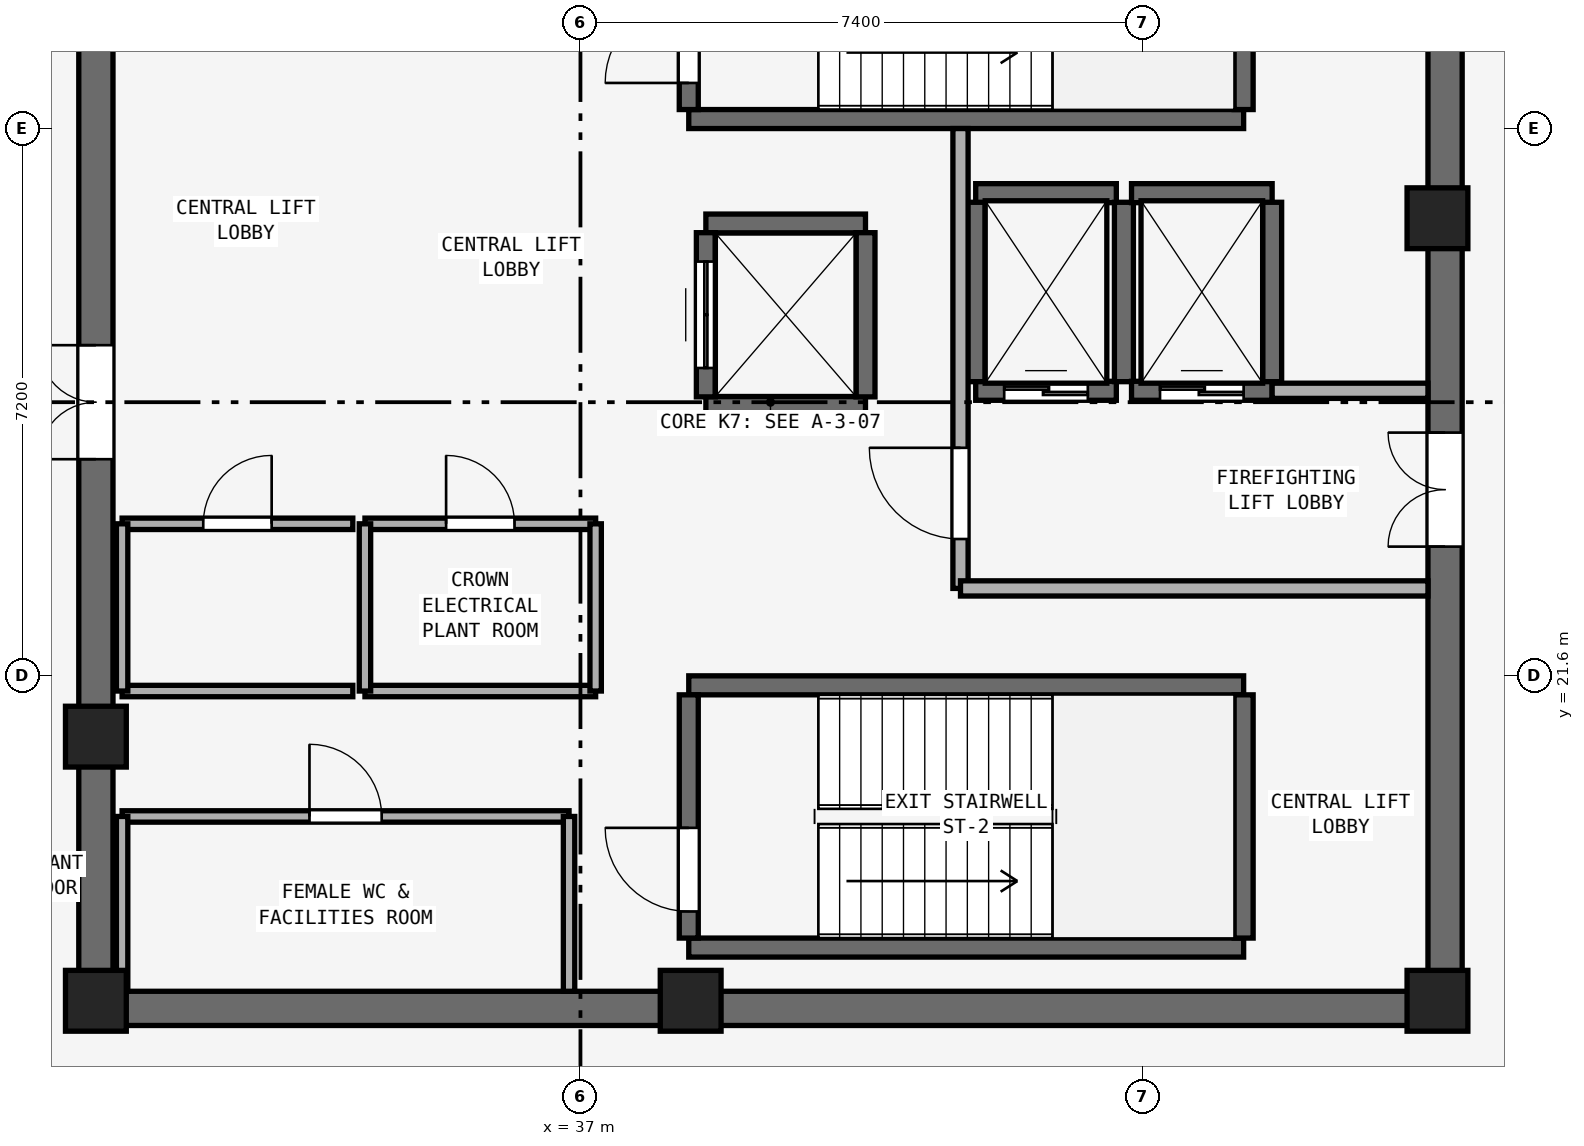
"""IFC4 building model, lengths in metres.
Left out: names, types, materials, properties, quantities, classifications, styles, units other than length and angle.
Written with IfcOpenShell. Run it as: python <this file> out.ifc"""

import sys

from ifc_helpers import new_model, si_unit, direction, frame, frame_2d, origin, origin_2d, place, context, subcontext, project, spatial, rectangle, extrude, element, fill, save


model = new_model("IFC4")
c1 = context("Model", 3, precision=1e-05, world=origin(), true_north=direction((0.0, 1.0)))
c2 = subcontext(c1, "Body", "Model", "MODEL_VIEW")
j1 = project(units=[si_unit("LENGTHUNIT", "METRE"), si_unit("PLANEANGLEUNIT", "RADIAN")], contexts=[c1])
p1 = place(None, origin())
s1 = spatial("IfcSite", under=j1, at=p1, CompositionType="ELEMENT")
p2 = place(p1, origin())
s2 = spatial("IfcBuilding", under=s1, at=p2, CompositionType="ELEMENT")
p3 = place(p2, frame((0.0, 0.0, 313.4)))
s3 = spatial("IfcBuildingStorey", under=s2, at=p3, CompositionType="ELEMENT", Elevation=313.4)
p4 = place(p3, frame((30.4, 17.225, 0.0), z_axis=(0.0, 0.0, 1.0), x_axis=(1.0, 0.0, 0.0)))
e1 = element("IfcWall", 1, at=p4, inside=s3, PredefinedType="SHEAR", context=c2, shape_type="SweptSolid", body=[
    extrude(rectangle(XDim=18.2, YDim=0.45, at=frame_2d((9.1, 0.0))), origin(), (0.0, 0.0, 1.0), 3.72),
])
p5 = place(p3, frame((30.625, 17.45, 0.0), z_axis=(0.0, 0.0, 1.0), x_axis=(0.0, 1.0, 0.0)))
e2 = element("IfcWall", 2, at=p5, inside=s3, PredefinedType="SHEAR", context=c2, shape_type="SweptSolid", body=[
    extrude(rectangle(XDim=15.5, YDim=0.45, at=frame_2d((7.75, 0.0))), origin(), (0.0, 0.0, 1.0), 3.72),
])
p6 = place(p5, frame((7.0, 0.0, 0.0)))
e3 = element("IfcOpeningElement", 3, at=p6, cuts=e2, PredefinedType="OPENING", context=c2, shape_type="SweptSolid", body=[
    extrude(rectangle(XDim=1.5, YDim=2.15, at=frame_2d((0.75, 1.075))), frame((0.0, 0.235, 0.0), z_axis=(0.0, -1.0, 0.0), x_axis=(1.0, 0.0, 0.0)), (0.0, 0.0, 1.0), 0.47),
])
p7 = place(p3, frame((48.375, 17.45, 0.0), z_axis=(0.0, 0.0, 1.0), x_axis=(0.0, 1.0, 0.0)))
e4 = element("IfcWall", 4, at=p7, inside=s3, PredefinedType="SHEAR", context=c2, shape_type="SweptSolid", body=[
    extrude(rectangle(XDim=15.5, YDim=0.45, at=frame_2d((7.75, 0.0))), origin(), (0.0, 0.0, 1.0), 3.72),
])
p8 = place(p7, frame((5.85, 0.0, 0.0)))
e5 = element("IfcOpeningElement", 5, at=p8, cuts=e4, PredefinedType="OPENING", context=c2, shape_type="SweptSolid", body=[
    extrude(rectangle(XDim=1.5, YDim=2.15, at=frame_2d((0.75, 1.075))), frame((0.0, 0.235, 0.0), z_axis=(0.0, -1.0, 0.0), x_axis=(1.0, 0.0, 0.0)), (0.0, 0.0, 1.0), 0.47),
])
for number, where, z_axis, x_axis in (
    (6, (30.625, 17.325, 0.0), (0.0, 0.0, 1.0), (1.0, 0.0, 0.0)),
    (7, (38.45, 17.325, 0.0), (0.0, 0.0, 1.0), (1.0, 0.0, 0.0)),
    (8, (48.275, 17.325, 0.0), (0.0, 0.0, 1.0), (1.0, 0.0, 0.0)),
    (9, (48.275, 27.62, 0.0), (0.0, 0.0, 1.0), (1.0, 0.0, 0.0)),
    (10, (30.625, 20.8, 0.0), (0.0, 0.0, 1.0), (1.0, 0.0, 0.0)),
):
    element("IfcColumn", number, at=place(p3, frame(where, z_axis=z_axis, x_axis=x_axis)), inside=s3, PredefinedType="PILASTER", context=c2, shape_type="SweptSolid", body=[
        extrude(rectangle(XDim=0.8, YDim=0.8, at=origin_2d()), origin(), (0.0, 0.0, 1.0), 4.0),
    ])
p9 = place(p3, frame((38.425, 28.925, 0.0), z_axis=(0.0, 0.0, 1.0), x_axis=(1.0, 0.0, 0.0)))
e11 = element("IfcWall", 11, at=p9, inside=s3, PredefinedType="SHEAR", context=c2, shape_type="SweptSolid", body=[
    extrude(rectangle(XDim=7.3, YDim=0.25, at=frame_2d((3.65, 0.0))), origin(), (0.0, 0.0, 1.0), 3.72),
])
p10 = place(p3, frame((38.425, 29.05, 0.0), z_axis=(0.0, 0.0, 1.0), x_axis=(0.0, 1.0, 0.0)))
e12 = element("IfcWall", 12, at=p10, inside=s3, PredefinedType="SHEAR", context=c2, shape_type="SweptSolid", body=[
    extrude(rectangle(XDim=3.2, YDim=0.25, at=frame_2d((1.6, 0.0))), origin(), (0.0, 0.0, 1.0), 3.72),
])
p11 = place(p10, frame((0.35, 0.0, 0.0)))
e13 = element("IfcOpeningElement", 13, at=p11, cuts=e12, PredefinedType="OPENING", context=c2, shape_type="SweptSolid", body=[
    extrude(rectangle(XDim=1.1, YDim=2.15, at=frame_2d((0.55, 1.075))), frame((0.0, 0.135, 0.0), z_axis=(0.0, -1.0, 0.0), x_axis=(1.0, 0.0, 0.0)), (0.0, 0.0, 1.0), 0.27),
])
p12 = place(p3, frame((45.725, 29.05, 0.0), z_axis=(0.0, 0.0, 1.0), x_axis=(0.0, 1.0, 0.0)))
e14 = element("IfcWall", 14, at=p12, inside=s3, PredefinedType="SHEAR", context=c2, shape_type="SweptSolid", body=[
    extrude(rectangle(XDim=3.2, YDim=0.25, at=frame_2d((1.6, 0.0))), origin(), (0.0, 0.0, 1.0), 3.72),
])
for number, where, z_axis, x_axis in (
    (15, (38.425, 18.025, 0.0), (0.0, 0.0, 1.0), (1.0, 0.0, 0.0)),
    (16, (38.425, 21.475, 0.0), (0.0, 0.0, 1.0), (1.0, 0.0, 0.0)),
):
    element("IfcWall", number, at=place(p3, frame(where, z_axis=z_axis, x_axis=x_axis)), inside=s3, PredefinedType="SHEAR", context=c2, shape_type="SweptSolid", body=[
        extrude(rectangle(XDim=7.3, YDim=0.25, at=frame_2d((3.65, 0.0))), origin(), (0.0, 0.0, 1.0), 3.72),
    ])
p13 = place(p3, frame((38.425, 18.15, 0.0), z_axis=(0.0, 0.0, 1.0), x_axis=(0.0, 1.0, 0.0)))
e17 = element("IfcWall", 17, at=p13, inside=s3, PredefinedType="SHEAR", context=c2, shape_type="SweptSolid", body=[
    extrude(rectangle(XDim=3.2, YDim=0.25, at=frame_2d((1.6, 0.0))), origin(), (0.0, 0.0, 1.0), 3.72),
])
p14 = place(p13, frame((0.35, 0.0, 0.0)))
e18 = element("IfcOpeningElement", 18, at=p14, cuts=e17, PredefinedType="OPENING", context=c2, shape_type="SweptSolid", body=[
    extrude(rectangle(XDim=1.1, YDim=2.15, at=frame_2d((0.55, 1.075))), frame((0.0, 0.135, 0.0), z_axis=(0.0, -1.0, 0.0), x_axis=(1.0, 0.0, 0.0)), (0.0, 0.0, 1.0), 0.27),
])
p15 = place(p3, frame((45.725, 18.15, 0.0), z_axis=(0.0, 0.0, 1.0), x_axis=(0.0, 1.0, 0.0)))
e19 = element("IfcWall", 19, at=p15, inside=s3, PredefinedType="SHEAR", context=c2, shape_type="SweptSolid", body=[
    extrude(rectangle(XDim=3.2, YDim=0.25, at=frame_2d((1.6, 0.0))), origin(), (0.0, 0.0, 1.0), 3.72),
])
p16 = place(p3, frame((42.2, 25.35, 0.0), z_axis=(0.0, 0.0, 1.0), x_axis=(1.0, 0.0, 0.0)))
e20 = element("IfcWall", 20, at=p16, inside=s3, PredefinedType="SHEAR", context=c2, shape_type="SweptSolid", body=[
    extrude(rectangle(XDim=1.85, YDim=0.25, at=frame_2d((0.925, 0.0))), origin(), (0.0, 0.0, 1.0), 3.72),
])
p17 = place(p16, frame((0.375, 0.0, 0.0)))
e21 = element("IfcOpeningElement", 21, at=p17, cuts=e20, PredefinedType="OPENING", context=c2, shape_type="SweptSolid", body=[
    extrude(rectangle(XDim=1.1, YDim=2.15, at=frame_2d((0.55, 1.075))), frame((0.0, 0.135, 0.0), z_axis=(0.0, -1.0, 0.0), x_axis=(1.0, 0.0, 0.0)), (0.0, 0.0, 1.0), 0.27),
])
p18 = place(p3, frame((42.2, 27.95, 0.0), z_axis=(0.0, 0.0, 1.0), x_axis=(1.0, 0.0, 0.0)))
e22 = element("IfcWall", 22, at=p18, inside=s3, PredefinedType="SHEAR", context=c2, shape_type="SweptSolid", body=[
    extrude(rectangle(XDim=1.85, YDim=0.25, at=frame_2d((0.925, 0.0))), origin(), (0.0, 0.0, 1.0), 3.72),
])
for number, where, z_axis, x_axis in (
    (23, (42.2, 25.47, 0.0), (0.0, 0.0, 1.0), (0.0, 1.0, 0.0)),
    (24, (44.15, 25.47, 0.0), (0.0, 0.0, 1.0), (0.0, 1.0, 0.0)),
):
    element("IfcWall", number, at=place(p3, frame(where, z_axis=z_axis, x_axis=x_axis)), inside=s3, PredefinedType="SHEAR", context=c2, shape_type="SweptSolid", body=[
        extrude(rectangle(XDim=2.36, YDim=0.25, at=frame_2d((1.18, 0.0))), origin(), (0.0, 0.0, 1.0), 3.72),
    ])
p19 = place(p3, frame((44.25, 25.35, 0.0), z_axis=(0.0, 0.0, 1.0), x_axis=(1.0, 0.0, 0.0)))
e25 = element("IfcWall", 25, at=p19, inside=s3, PredefinedType="SHEAR", context=c2, shape_type="SweptSolid", body=[
    extrude(rectangle(XDim=1.85, YDim=0.25, at=frame_2d((0.925, 0.0))), origin(), (0.0, 0.0, 1.0), 3.72),
])
p20 = place(p19, frame((0.375, 0.0, 0.0)))
e26 = element("IfcOpeningElement", 26, at=p20, cuts=e25, PredefinedType="OPENING", context=c2, shape_type="SweptSolid", body=[
    extrude(rectangle(XDim=1.1, YDim=2.15, at=frame_2d((0.55, 1.075))), frame((0.0, 0.135, 0.0), z_axis=(0.0, -1.0, 0.0), x_axis=(1.0, 0.0, 0.0)), (0.0, 0.0, 1.0), 0.27),
])
p21 = place(p3, frame((44.25, 27.95, 0.0), z_axis=(0.0, 0.0, 1.0), x_axis=(1.0, 0.0, 0.0)))
e27 = element("IfcWall", 27, at=p21, inside=s3, PredefinedType="SHEAR", context=c2, shape_type="SweptSolid", body=[
    extrude(rectangle(XDim=1.85, YDim=0.25, at=frame_2d((0.925, 0.0))), origin(), (0.0, 0.0, 1.0), 3.72),
])
p22 = place(p3, frame((46.1, 25.47, 0.0), z_axis=(0.0, 0.0, 1.0), x_axis=(0.0, 1.0, 0.0)))
e28 = element("IfcWall", 28, at=p22, inside=s3, PredefinedType="SHEAR", context=c2, shape_type="SweptSolid", body=[
    extrude(rectangle(XDim=2.36, YDim=0.25, at=frame_2d((1.18, 0.0))), origin(), (0.0, 0.0, 1.0), 3.72),
])
for number, where, z_axis, x_axis in (
    (29, (38.65, 25.15, 0.0), (0.0, 0.0, 1.0), (1.0, 0.0, 0.0)),
    (30, (38.65, 27.55, 0.0), (0.0, 0.0, 1.0), (1.0, 0.0, 0.0)),
):
    element("IfcWall", number, at=place(p3, frame(where, z_axis=z_axis, x_axis=x_axis)), inside=s3, PredefinedType="SHEAR", context=c2, shape_type="SweptSolid", body=[
        extrude(rectangle(XDim=2.1, YDim=0.25, at=frame_2d((1.05, 0.0))), origin(), (0.0, 0.0, 1.0), 3.72),
    ])
p23 = place(p3, frame((38.65, 25.27, 0.0), z_axis=(0.0, 0.0, 1.0), x_axis=(0.0, 1.0, 0.0)))
e31 = element("IfcWall", 31, at=p23, inside=s3, PredefinedType="SHEAR", context=c2, shape_type="SweptSolid", body=[
    extrude(rectangle(XDim=2.16, YDim=0.25, at=frame_2d((1.08, 0.0))), origin(), (0.0, 0.0, 1.0), 3.72),
])
p24 = place(p23, frame((0.38, 0.0, 0.0)))
e32 = element("IfcOpeningElement", 32, at=p24, cuts=e31, PredefinedType="OPENING", context=c2, shape_type="SweptSolid", body=[
    extrude(rectangle(XDim=1.4, YDim=2.2, at=frame_2d((0.7, 1.1))), frame((0.0, 0.135, 0.0), z_axis=(0.0, -1.0, 0.0), x_axis=(1.0, 0.0, 0.0)), (0.0, 0.0, 1.0), 0.27),
])
p25 = place(p3, frame((40.75, 25.27, 0.0), z_axis=(0.0, 0.0, 1.0), x_axis=(0.0, 1.0, 0.0)))
e33 = element("IfcWall", 33, at=p25, inside=s3, PredefinedType="SHEAR", context=c2, shape_type="SweptSolid", body=[
    extrude(rectangle(XDim=2.16, YDim=0.25, at=frame_2d((1.08, 0.0))), origin(), (0.0, 0.0, 1.0), 3.72),
])
p26 = place(p3, frame((42.0, 22.75, 0.0), z_axis=(0.0, 0.0, 1.0), x_axis=(0.0, 1.0, 0.0)))
e34 = element("IfcWall", 34, at=p26, inside=s3, PredefinedType="SOLIDWALL", context=c2, shape_type="SweptSolid", body=[
    extrude(rectangle(XDim=6.05, YDim=0.2, at=frame_2d((3.025, 0.0))), origin(), (0.0, 0.0, 1.0), 3.72),
])
p27 = place(p26, frame((0.65, 0.0, 0.0)))
e35 = element("IfcOpeningElement", 35, at=p27, cuts=e34, PredefinedType="OPENING", context=c2, shape_type="SweptSolid", body=[
    extrude(rectangle(XDim=1.2, YDim=2.15, at=frame_2d((0.6, 1.075))), frame((0.0, 0.11, 0.0), z_axis=(0.0, -1.0, 0.0), x_axis=(1.0, 0.0, 0.0)), (0.0, 0.0, 1.0), 0.22),
])
p28 = place(p3, frame((42.0, 22.75, 0.0), z_axis=(0.0, 0.0, 1.0), x_axis=(1.0, 0.0, 0.0)))
e36 = element("IfcWall", 36, at=p28, inside=s3, PredefinedType="SOLIDWALL", context=c2, shape_type="SweptSolid", body=[
    extrude(rectangle(XDim=6.15, YDim=0.2, at=frame_2d((3.075, 0.0))), origin(), (0.0, 0.0, 1.0), 3.72),
])
p29 = place(p3, frame((46.1, 25.35, 0.0), z_axis=(0.0, 0.0, 1.0), x_axis=(1.0, 0.0, 0.0)))
e37 = element("IfcWall", 37, at=p29, inside=s3, PredefinedType="SOLIDWALL", context=c2, shape_type="SweptSolid", body=[
    extrude(rectangle(XDim=2.05, YDim=0.2, at=frame_2d((1.025, 0.0))), origin(), (0.0, 0.0, 1.0), 3.72),
])
p30 = place(p3, frame((30.97, 19.75, 0.0), z_axis=(0.0, 0.0, 1.0), x_axis=(1.0, 0.0, 0.0)))
e38 = element("IfcWall", 38, at=p30, inside=s3, PredefinedType="PARTITIONING", context=c2, shape_type="SweptSolid", body=[
    extrude(rectangle(XDim=5.88, YDim=0.15, at=frame_2d((2.94, 0.0))), origin(), (0.0, 0.0, 1.0), 3.72),
])
p31 = place(p30, frame((2.465, 0.0, 0.0)))
e39 = element("IfcOpeningElement", 39, at=p31, cuts=e38, PredefinedType="OPENING", context=c2, shape_type="SweptSolid", body=[
    extrude(rectangle(XDim=0.95, YDim=2.1, at=frame_2d((0.475, 1.05))), frame((0.0, 0.085, 0.0), z_axis=(0.0, -1.0, 0.0), x_axis=(1.0, 0.0, 0.0)), (0.0, 0.0, 1.0), 0.17),
])
p32 = place(p3, frame((30.97, 17.45, 0.0), z_axis=(0.0, 0.0, 1.0), x_axis=(0.0, 1.0, 0.0)))
e40 = element("IfcWall", 40, at=p32, inside=s3, PredefinedType="PARTITIONING", context=c2, shape_type="SweptSolid", body=[
    extrude(rectangle(XDim=2.3, YDim=0.15, at=frame_2d((1.15, 0.0))), origin(), (0.0, 0.0, 1.0), 2.82),
])
p33 = place(p3, frame((36.85, 17.45, 0.0), z_axis=(0.0, 0.0, 1.0), x_axis=(0.0, 1.0, 0.0)))
e41 = element("IfcWall", 41, at=p33, inside=s3, PredefinedType="PARTITIONING", context=c2, shape_type="SweptSolid", body=[
    extrude(rectangle(XDim=2.3, YDim=0.15, at=frame_2d((1.15, 0.0))), origin(), (0.0, 0.0, 1.0), 3.72),
])
p34 = place(p3, frame((30.97, 21.4, 0.0), z_axis=(0.0, 0.0, 1.0), x_axis=(1.0, 0.0, 0.0)))
e42 = element("IfcWall", 42, at=p34, inside=s3, PredefinedType="PARTITIONING", context=c2, shape_type="SweptSolid", body=[
    extrude(rectangle(XDim=3.035, YDim=0.15, at=frame_2d((1.518, 0.0))), origin(), (0.0, 0.0, 1.0), 3.72),
])
p35 = place(p3, frame((30.97, 23.6, 0.0), z_axis=(0.0, 0.0, 1.0), x_axis=(1.0, 0.0, 0.0)))
e43 = element("IfcWall", 43, at=p35, inside=s3, PredefinedType="PARTITIONING", context=c2, shape_type="SweptSolid", body=[
    extrude(rectangle(XDim=3.035, YDim=0.15, at=frame_2d((1.518, 0.0))), origin(), (0.0, 0.0, 1.0), 3.72),
])
p36 = place(p35, frame((1.067, 0.0, 0.0)))
e44 = element("IfcOpeningElement", 44, at=p36, cuts=e43, PredefinedType="OPENING", context=c2, shape_type="SweptSolid", body=[
    extrude(rectangle(XDim=0.9, YDim=2.1, at=frame_2d((0.45, 1.05))), frame((0.0, 0.085, 0.0), z_axis=(0.0, -1.0, 0.0), x_axis=(1.0, 0.0, 0.0)), (0.0, 0.0, 1.0), 0.17),
])
p37 = place(p3, frame((30.97, 21.4, 0.0), z_axis=(0.0, 0.0, 1.0), x_axis=(0.0, 1.0, 0.0)))
e45 = element("IfcWall", 45, at=p37, inside=s3, PredefinedType="PARTITIONING", context=c2, shape_type="SweptSolid", body=[
    extrude(rectangle(XDim=2.2, YDim=0.15, at=frame_2d((1.1, 0.0))), origin(), (0.0, 0.0, 1.0), 2.82),
])
p38 = place(p3, frame((34.165, 21.4, 0.0), z_axis=(0.0, 0.0, 1.0), x_axis=(1.0, 0.0, 0.0)))
e46 = element("IfcWall", 46, at=p38, inside=s3, PredefinedType="PARTITIONING", context=c2, shape_type="SweptSolid", body=[
    extrude(rectangle(XDim=3.035, YDim=0.15, at=frame_2d((1.518, 0.0))), origin(), (0.0, 0.0, 1.0), 3.72),
])
p39 = place(p3, frame((34.165, 23.6, 0.0), z_axis=(0.0, 0.0, 1.0), x_axis=(1.0, 0.0, 0.0)))
e47 = element("IfcWall", 47, at=p39, inside=s3, PredefinedType="PARTITIONING", context=c2, shape_type="SweptSolid", body=[
    extrude(rectangle(XDim=3.035, YDim=0.15, at=frame_2d((1.518, 0.0))), origin(), (0.0, 0.0, 1.0), 3.72),
])
p40 = place(p39, frame((1.067, 0.0, 0.0)))
e48 = element("IfcOpeningElement", 48, at=p40, cuts=e47, PredefinedType="OPENING", context=c2, shape_type="SweptSolid", body=[
    extrude(rectangle(XDim=0.9, YDim=2.1, at=frame_2d((0.45, 1.05))), frame((0.0, 0.085, 0.0), z_axis=(0.0, -1.0, 0.0), x_axis=(1.0, 0.0, 0.0)), (0.0, 0.0, 1.0), 0.17),
])
for number, where, z_axis, x_axis in (
    (49, (34.165, 21.4, 0.0), (0.0, 0.0, 1.0), (0.0, 1.0, 0.0)),
    (50, (37.2, 21.4, 0.0), (0.0, 0.0, 1.0), (0.0, 1.0, 0.0)),
):
    element("IfcWall", number, at=place(p3, frame(where, z_axis=z_axis, x_axis=x_axis)), inside=s3, PredefinedType="PARTITIONING", context=c2, shape_type="SweptSolid", body=[
        extrude(rectangle(XDim=2.2, YDim=0.15, at=frame_2d((1.1, 0.0))), origin(), (0.0, 0.0, 1.0), 3.72),
    ])
p41 = place(p11, origin())
e51 = element("IfcDoor", 51, at=p41, inside=s3, OperationType="SINGLE_SWING_LEFT", PredefinedType="DOOR", context=c2, shape_type="SweptSolid", body=[
    extrude(rectangle(XDim=1.1, YDim=2.15, at=frame_2d((0.55, 1.075))), frame((0.0, 0.025, 0.0), z_axis=(0.0, -1.0, 0.0), x_axis=(1.0, 0.0, 0.0)), (0.0, 0.0, 1.0), 0.05),
])
fill(e13, e51)
p42 = place(p14, origin())
e52 = element("IfcDoor", 52, at=p42, inside=s3, OperationType="SINGLE_SWING_RIGHT", PredefinedType="DOOR", context=c2, shape_type="SweptSolid", body=[
    extrude(rectangle(XDim=1.1, YDim=2.15, at=frame_2d((0.55, 1.075))), frame((0.0, 0.025, 0.0), z_axis=(0.0, -1.0, 0.0), x_axis=(1.0, 0.0, 0.0)), (0.0, 0.0, 1.0), 0.05),
])
fill(e18, e52)
p43 = place(p17, origin())
e53 = element("IfcDoor", 53, at=p43, inside=s3, OperationType="DOUBLE_DOOR_SLIDING", PredefinedType="DOOR", context=c2, shape_type="SweptSolid", body=[
    extrude(rectangle(XDim=1.1, YDim=2.15, at=frame_2d((0.55, 1.075))), frame((0.0, 0.025, 0.0), z_axis=(0.0, -1.0, 0.0), x_axis=(1.0, 0.0, 0.0)), (0.0, 0.0, 1.0), 0.05),
])
fill(e21, e53)
p44 = place(p20, origin())
e54 = element("IfcDoor", 54, at=p44, inside=s3, OperationType="DOUBLE_DOOR_SLIDING", PredefinedType="DOOR", context=c2, shape_type="SweptSolid", body=[
    extrude(rectangle(XDim=1.1, YDim=2.15, at=frame_2d((0.55, 1.075))), frame((0.0, 0.025, 0.0), z_axis=(0.0, -1.0, 0.0), x_axis=(1.0, 0.0, 0.0)), (0.0, 0.0, 1.0), 0.05),
])
fill(e26, e54)
p45 = place(p24, origin())
e55 = element("IfcDoor", 55, at=p45, inside=s3, OperationType="DOUBLE_DOOR_SLIDING", PredefinedType="DOOR", context=c2, shape_type="SweptSolid", body=[
    extrude(rectangle(XDim=1.4, YDim=2.2, at=frame_2d((0.7, 1.1))), frame((0.0, 0.025, 0.0), z_axis=(0.0, -1.0, 0.0), x_axis=(1.0, 0.0, 0.0)), (0.0, 0.0, 1.0), 0.05),
])
fill(e32, e55)
p46 = place(p27, origin())
e56 = element("IfcDoor", 56, at=p46, inside=s3, OperationType="SINGLE_SWING_RIGHT", PredefinedType="DOOR", context=c2, shape_type="SweptSolid", body=[
    extrude(rectangle(XDim=1.2, YDim=2.15, at=frame_2d((0.6, 1.075))), frame((0.0, 0.025, 0.0), z_axis=(0.0, -1.0, 0.0), x_axis=(1.0, 0.0, 0.0)), (0.0, 0.0, 1.0), 0.05),
])
fill(e35, e56)
p47 = place(p6, origin())
e57 = element("IfcDoor", 57, at=p47, inside=s3, OperationType="DOUBLE_DOOR_SINGLE_SWING", PredefinedType="DOOR", context=c2, shape_type="SweptSolid", body=[
    extrude(rectangle(XDim=1.5, YDim=2.15, at=frame_2d((0.75, 1.075))), frame((0.0, 0.025, 0.0), z_axis=(0.0, -1.0, 0.0), x_axis=(1.0, 0.0, 0.0)), (0.0, 0.0, 1.0), 0.05),
])
fill(e3, e57)
p48 = place(p8, origin())
e58 = element("IfcDoor", 58, at=p48, inside=s3, OperationType="DOUBLE_DOOR_SINGLE_SWING", PredefinedType="DOOR", context=c2, shape_type="SweptSolid", body=[
    extrude(rectangle(XDim=1.5, YDim=2.15, at=frame_2d((0.75, 1.075))), frame((0.0, 0.025, 0.0), z_axis=(0.0, -1.0, 0.0), x_axis=(1.0, 0.0, 0.0)), (0.0, 0.0, 1.0), 0.05),
])
fill(e5, e58)
p49 = place(p31, origin())
e59 = element("IfcDoor", 59, at=p49, inside=s3, OperationType="SINGLE_SWING_LEFT", PredefinedType="DOOR", context=c2, shape_type="SweptSolid", body=[
    extrude(rectangle(XDim=0.95, YDim=2.1, at=frame_2d((0.475, 1.05))), frame((0.0, 0.025, 0.0), z_axis=(0.0, -1.0, 0.0), x_axis=(1.0, 0.0, 0.0)), (0.0, 0.0, 1.0), 0.05),
])
fill(e39, e59)
p50 = place(p36, origin())
e60 = element("IfcDoor", 60, at=p50, inside=s3, OperationType="SINGLE_SWING_RIGHT", PredefinedType="DOOR", context=c2, shape_type="SweptSolid", body=[
    extrude(rectangle(XDim=0.9, YDim=2.1, at=frame_2d((0.45, 1.05))), frame((0.0, 0.025, 0.0), z_axis=(0.0, -1.0, 0.0), x_axis=(1.0, 0.0, 0.0)), (0.0, 0.0, 1.0), 0.05),
])
fill(e44, e60)
p51 = place(p40, origin())
e61 = element("IfcDoor", 61, at=p51, inside=s3, OperationType="SINGLE_SWING_LEFT", PredefinedType="DOOR", context=c2, shape_type="SweptSolid", body=[
    extrude(rectangle(XDim=0.9, YDim=2.1, at=frame_2d((0.45, 1.05))), frame((0.0, 0.025, 0.0), z_axis=(0.0, -1.0, 0.0), x_axis=(1.0, 0.0, 0.0)), (0.0, 0.0, 1.0), 0.05),
])
fill(e48, e61)
save(model, sys.argv[1])
